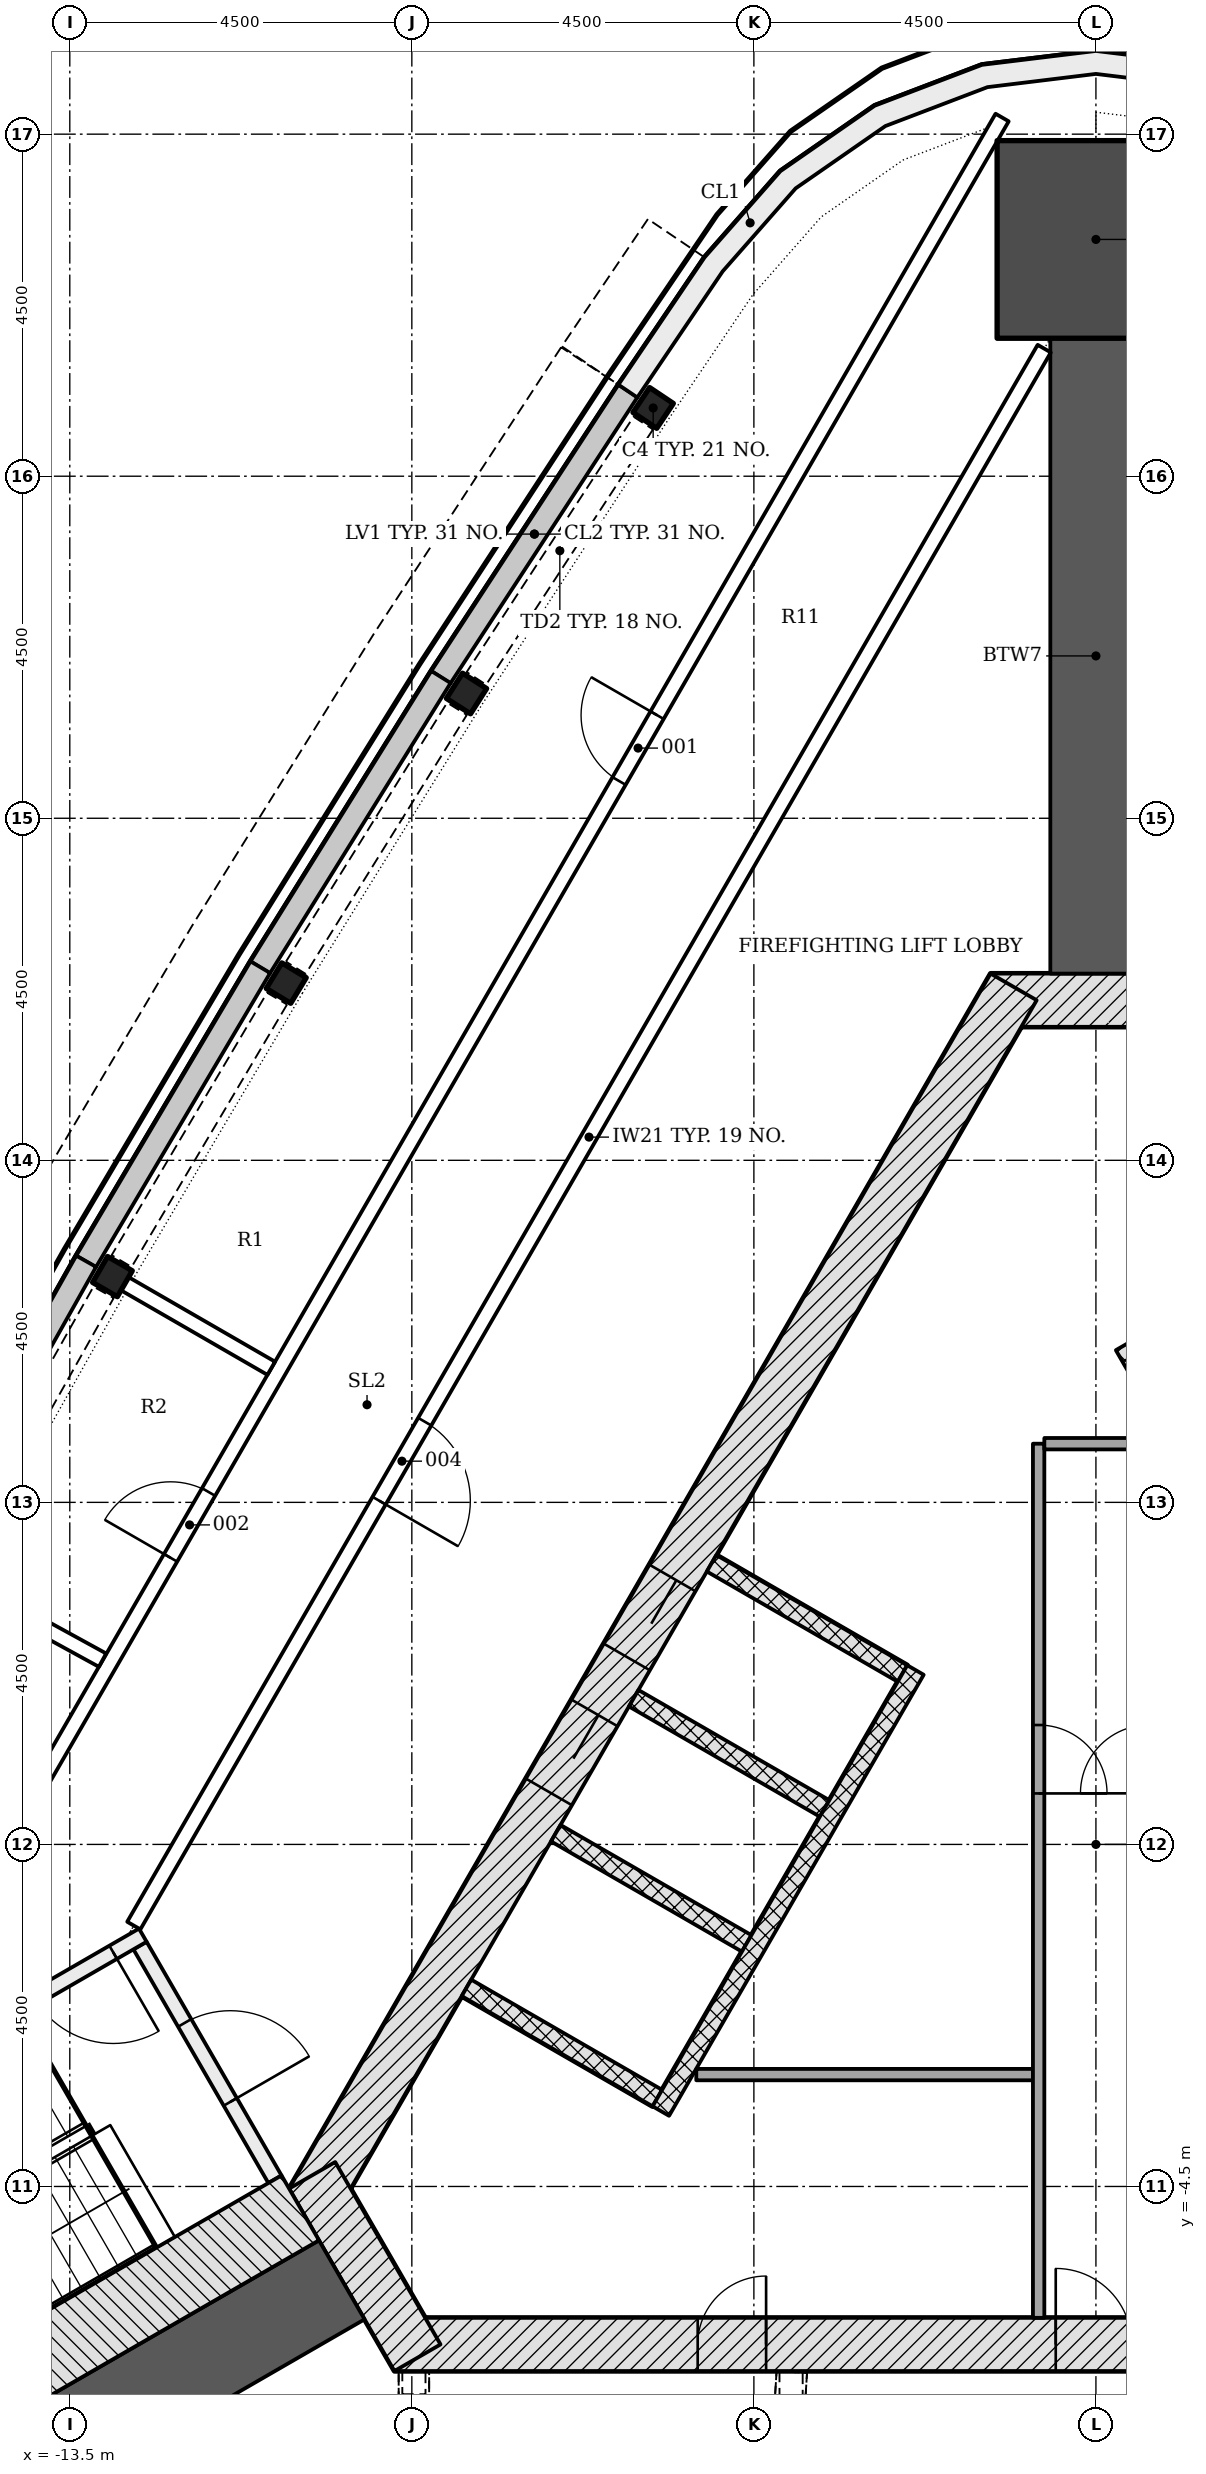
"""IFC4 building model, lengths in metres.
Left out: names, types, materials, properties, quantities, classifications, styles, units other than length and angle.
Written with IfcOpenShell. Run it as: python <this file> out.ifc"""

import sys

from ifc_helpers import new_model, si_unit, direction, frame, frame_2d, origin, origin_2d, place, context, subcontext, project, spatial, polyline, rectangle, i_section, outline, extrude, element, fill, save


model = new_model("IFC4")
c1 = context("Model", 3, precision=1e-05, world=origin(), true_north=direction((0.0, 1.0)))
c2 = subcontext(c1, "Body", "Model", "MODEL_VIEW")
j1 = project(units=[si_unit("LENGTHUNIT", "METRE"), si_unit("PLANEANGLEUNIT", "RADIAN")], contexts=[c1])
p1 = place(None, origin())
s1 = spatial("IfcSite", under=j1, at=p1, CompositionType="ELEMENT")
p2 = place(p1, origin())
s2 = spatial("IfcBuilding", under=s1, at=p2, CompositionType="ELEMENT")
p3 = place(p2, frame((0.0, 0.0, 210.3)))
s3 = spatial("IfcBuildingStorey", under=s2, at=p3, CompositionType="ELEMENT", Elevation=210.3)
p4 = place(p3, frame((-9.229, -6.578, -0.3), z_axis=(0.0, 0.0, 1.0), x_axis=(1.0, 0.0, 0.0)))
e1 = element("IfcWall", 1, at=p4, inside=s3, PredefinedType="SHEAR", context=c2, shape_type="SweptSolid", body=[
    extrude(rectangle(XDim=18.458, YDim=0.7, at=frame_2d((9.229, 0.0))), origin(), (0.0, 0.0, 1.0), 4.6),
])
p5 = place(p4, frame((8.7, 0.0, 0.3)))
e2 = element("IfcOpeningElement", 2, at=p5, cuts=e1, PredefinedType="OPENING", context=c2, shape_type="SweptSolid", body=[
    extrude(rectangle(XDim=1.0, YDim=2.1, at=frame_2d((0.5, 1.05))), frame((0.0, 0.36, 0.0), z_axis=(0.0, -1.0, 0.0), x_axis=(1.0, 0.0, 0.0)), (0.0, 0.0, 1.0), 0.72),
])
p6 = place(p4, frame((3.99, 0.0, 0.3)))
e3 = element("IfcOpeningElement", 3, at=p6, cuts=e1, PredefinedType="OPENING", context=c2, shape_type="SweptSolid", body=[
    extrude(rectangle(XDim=0.9, YDim=2.1, at=frame_2d((0.45, 1.05))), frame((0.0, 0.36, 0.0), z_axis=(0.0, -1.0, 0.0), x_axis=(1.0, 0.0, 0.0)), (0.0, 0.0, 1.0), 0.72),
])
p7 = place(p4, frame((13.539, 0.0, 0.3)))
e4 = element("IfcOpeningElement", 4, at=p7, cuts=e1, PredefinedType="OPENING", context=c2, shape_type="SweptSolid", body=[
    extrude(rectangle(XDim=0.9, YDim=2.1, at=frame_2d((0.45, 1.05))), frame((0.0, 0.36, 0.0), z_axis=(0.0, -1.0, 0.0), x_axis=(1.0, 0.0, 0.0)), (0.0, 0.0, 1.0), 0.72),
])
p8 = place(p3, frame((1.386, 11.106, -0.3), z_axis=(0.0, 0.0, 1.0), x_axis=(-1.0, 0.0, 0.0)))
e5 = element("IfcWall", 5, at=p8, inside=s3, PredefinedType="SHEAR", context=c2, shape_type="SweptSolid", body=[
    extrude(rectangle(XDim=2.771, YDim=0.7, at=frame_2d((1.386, 0.0))), origin(), (0.0, 0.0, 1.0), 4.6),
])
p9 = place(p3, frame((-1.083, 11.281, -0.3), z_axis=(0.0, 0.0, 1.0), x_axis=(-0.500001446645, -0.866024568562, 0.0)))
e6 = element("IfcWall", 6, at=p9, inside=s3, PredefinedType="SHEAR", context=c2, shape_type="SweptSolid", body=[
    extrude(rectangle(XDim=18.458, YDim=0.7, at=frame_2d((9.229, 0.0))), origin(), (0.0, 0.0, 1.0), 4.6),
])
p10 = place(p9, frame((8.979, 0.0, 0.3)))
e7 = element("IfcOpeningElement", 7, at=p10, cuts=e6, PredefinedType="OPENING", context=c2, shape_type="SweptSolid", body=[
    extrude(rectangle(XDim=1.2, YDim=2.1, at=frame_2d((0.6, 1.05))), frame((0.0, 0.36, 0.0), z_axis=(0.0, -1.0, 0.0), x_axis=(1.0, 0.0, 0.0)), (0.0, 0.0, 1.0), 0.72),
])
p11 = place(p9, frame((11.029, 0.0, 0.3)))
e8 = element("IfcOpeningElement", 8, at=p11, cuts=e6, PredefinedType="OPENING", context=c2, shape_type="SweptSolid", body=[
    extrude(rectangle(XDim=1.2, YDim=2.1, at=frame_2d((0.6, 1.05))), frame((0.0, 0.36, 0.0), z_axis=(0.0, -1.0, 0.0), x_axis=(1.0, 0.0, 0.0)), (0.0, 0.0, 1.0), 0.72),
])
p12 = place(p3, frame((-10.311, -4.353, -0.3), z_axis=(0.0, 0.0, 1.0), x_axis=(0.500042739161, -0.866000726912, 0.0)))
e9 = element("IfcWall", 9, at=p12, inside=s3, PredefinedType="SHEAR", context=c2, shape_type="SweptSolid", body=[
    extrude(rectangle(XDim=2.771, YDim=0.7, at=frame_2d((1.386, 0.0))), origin(), (0.0, 0.0, 1.0), 4.6),
])
for number, where, z_axis, x_axis in (
    (10, (0.0, 11.456, -0.3), (0.0, 0.0, 1.0), (0.0, 1.0, 0.0)),
    (11, (-9.922, -5.728, -0.3), (0.0, 0.0, 1.0), (-0.866, -0.5, 0.0)),
):
    element("IfcWall", number, at=place(p3, frame(where, z_axis=z_axis, x_axis=x_axis)), inside=s3, PredefinedType="SHEAR", context=c2, shape_type="SweptSolid", body=[
        extrude(rectangle(XDim=8.359, YDim=1.2, at=frame_2d((4.179, 0.0))), origin(), (0.0, 0.0, 1.0), 4.6),
    ])
p13 = place(p3, frame((0.0, 21.115, -0.3), z_axis=(0.0, 0.0, 1.0), x_axis=(0.0, 1.0, 0.0)))
e12 = element("IfcColumn", 12, at=p13, inside=s3, PredefinedType="COLUMN", context=c2, shape_type="SweptSolid", body=[
    extrude(rectangle(XDim=2.6, YDim=2.6, at=origin_2d()), origin(), (0.0, 0.0, 1.0), 4.6),
])
for number, where, z_axis, x_axis in (
    (13, (-5.825, 18.898, -0.3), (0.0, 0.0, 1.0), (-0.556, -0.831, 0.0)),
    (14, (-8.281, 15.142, -0.3), (0.0, 0.0, 1.0), (-0.538, -0.843, 0.0)),
    (15, (-10.652, 11.332, -0.3), (0.0, 0.0, 1.0), (-0.519, -0.855, 0.0)),
    (16, (-12.939, 7.47, -0.3), (0.0, 0.0, 1.0), (-0.5, -0.866, 0.0)),
):
    element("IfcColumn", number, at=place(p3, frame(where, z_axis=z_axis, x_axis=x_axis)), inside=s3, PredefinedType="COLUMN", context=c2, shape_type="SweptSolid", body=[
        extrude(i_section(OverallWidth=0.394, OverallDepth=0.376, WebThickness=0.017, FlangeThickness=0.028, FilletRadius=0.015, at=origin_2d()), origin(), (0.0, 0.0, 1.0), 4.6),
    ])
p14 = place(p3, origin())
e17 = element("IfcWall", 17, at=p14, inside=s3, PredefinedType="NOTDEFINED", context=c2, shape_type="SweptSolid", body=[
    extrude(outline(polyline([(-6.282, 19.204), (-8.744, 15.437), (-8.493, 15.273), (-6.031, 19.04), (-6.282, 19.204)])), origin(), (0.0, 0.0, 1.0), 1.2),
])
p15 = place(p3, origin())
e18 = element("IfcWall", 18, at=p15, inside=s3, PredefinedType="NOTDEFINED", context=c2, shape_type="SweptSolid", body=[
    extrude(outline(polyline([(-8.744, 15.437), (-11.122, 11.617), (-10.867, 11.458), (-8.49, 15.279), (-8.744, 15.437)])), origin(), (0.0, 0.0, 1.0), 1.2),
])
p16 = place(p3, origin())
e19 = element("IfcWall", 19, at=p16, inside=s3, PredefinedType="NOTDEFINED", context=c2, shape_type="SweptSolid", body=[
    extrude(outline(polyline([(-11.122, 11.617), (-13.415, 7.745), (-13.157, 7.592), (-10.864, 11.464), (-11.122, 11.617)])), origin(), (0.0, 0.0, 1.0), 1.2),
])
p17 = place(p3, origin())
e20 = element("IfcWall", 20, at=p17, inside=s3, PredefinedType="NOTDEFINED", context=c2, shape_type="SweptSolid", body=[
    extrude(outline(polyline([(-13.415, 7.745), (-15.622, 3.823), (-15.36, 3.677), (-13.154, 7.598), (-13.415, 7.745)])), origin(), (0.0, 0.0, 1.0), 1.2),
])
p18 = place(p3, origin())
e21 = element("IfcWall", 21, at=p18, inside=s3, PredefinedType="NOTDEFINED", context=c2, shape_type="SweptSolid", body=[
    extrude(outline(polyline([(6.282, 19.204), (5.149, 20.879), (4.151, 22.013), (2.911, 22.874), (1.499, 23.412), (0.0, 23.595), (-1.499, 23.412), (-2.911, 22.874), (-4.151, 22.013), (-5.149, 20.879), (-6.282, 19.204), (-6.034, 19.036), (-4.911, 20.695), (-3.95, 21.787), (-2.77, 22.607), (-1.427, 23.119), (0.0, 23.293), (1.427, 23.119), (2.77, 22.607), (3.95, 21.787), (4.911, 20.695), (6.034, 19.036), (6.282, 19.204)])), origin(), (0.0, 0.0, 1.0), 4.3),
])
p19 = place(p3, frame((5.87, -2.961, 0.0), z_axis=(0.0, 0.0, 1.0), x_axis=(-0.50000615651, 0.866021849293, 0.0)))
e22 = element("IfcWall", 22, at=p19, inside=s3, PredefinedType="PARTITIONING", context=c2, shape_type="SweptSolid", body=[
    extrude(rectangle(XDim=11.0, YDim=0.25, at=frame_2d((5.5, 0.0))), origin(), (0.0, 0.0, 1.0), 4.3),
])
for number, where, z_axis, x_axis in (
    (23, (-5.056, 3.699, -0.3), (0.0, 0.0, 1.0), (0.866, -0.5, 0.0)),
    (24, (-6.081, 1.923, -0.3), (0.0, 0.0, 1.0), (0.866, -0.5, 0.0)),
    (25, (-7.106, 0.148, -0.3), (0.0, 0.0, 1.0), (0.866, -0.5, 0.0)),
    (26, (-8.281, -1.887, -0.3), (0.0, 0.0, 1.0), (0.866, -0.5, 0.0)),
):
    element("IfcWall", number, at=place(p3, frame(where, z_axis=z_axis, x_axis=x_axis)), inside=s3, PredefinedType="PARTITIONING", context=c2, shape_type="SweptSolid", body=[
        extrude(rectangle(XDim=2.9, YDim=0.25, at=frame_2d((1.45, 0.0))), origin(), (0.0, 0.0, 1.0), 4.6),
    ])
p20 = place(p3, frame((-2.374, 2.294, 0.0), z_axis=(0.0, 0.0, 1.0), x_axis=(-0.500003174267, -0.866023571113, 0.0)))
e27 = element("IfcWall", 27, at=p20, inside=s3, PredefinedType="PARTITIONING", context=c2, shape_type="SweptSolid", body=[
    extrude(rectangle(XDim=6.7, YDim=0.25, at=frame_2d((3.35, 0.0))), origin(), (0.0, 0.0, 1.0), 4.3),
])
p21 = place(p3, frame((-5.258, -3.028, 0.0), z_axis=(0.0, 0.0, 1.0), x_axis=(1.0, 0.0, 0.0)))
e28 = element("IfcWall", 28, at=p21, inside=s3, PredefinedType="PARTITIONING", context=c2, shape_type="SweptSolid", body=[
    extrude(rectangle(XDim=4.429, YDim=0.15, at=frame_2d((2.215, 0.0))), origin(), (0.0, 0.0, 1.0), 4.3),
])
p22 = place(p3, frame((-0.754, 5.272, 0.0), z_axis=(0.0, 0.0, 1.0), x_axis=(0.0, -1.0, 0.0)))
e29 = element("IfcWall", 29, at=p22, inside=s3, PredefinedType="PARTITIONING", context=c2, shape_type="SweptSolid", body=[
    extrude(rectangle(XDim=11.5, YDim=0.15, at=frame_2d((5.75, 0.0))), origin(), (0.0, 0.0, 1.0), 4.3),
])
p23 = place(p22, frame((3.701, 0.0, 0.0)))
e30 = element("IfcOpeningElement", 30, at=p23, cuts=e29, PredefinedType="OPENING", context=c2, shape_type="SweptSolid", body=[
    extrude(rectangle(XDim=0.9, YDim=2.1, at=frame_2d((0.45, 1.05))), frame((0.0, 0.085, 0.0), z_axis=(0.0, -1.0, 0.0), x_axis=(1.0, 0.0, 0.0)), (0.0, 0.0, 1.0), 0.17),
])
p24 = place(p3, frame((-0.679, 5.272, 0.0), z_axis=(0.0, 0.0, 1.0), x_axis=(1.0, 0.0, 0.0)))
e31 = element("IfcWall", 31, at=p24, inside=s3, PredefinedType="PARTITIONING", context=c2, shape_type="SweptSolid", body=[
    extrude(rectangle(XDim=1.3, YDim=0.15, at=frame_2d((0.65, 0.0))), origin(), (0.0, 0.0, 1.0), 4.3),
])
p25 = place(p3, frame((-12.576, -1.331, -0.3), z_axis=(0.0, 0.0, 1.0), x_axis=(0.499970499736, -0.8660424351, 0.0)))
e32 = element("IfcWall", 32, at=p25, inside=s3, PredefinedType="SHEAR", context=c2, shape_type="SweptSolid", body=[
    extrude(rectangle(XDim=3.55, YDim=0.2, at=frame_2d((1.775, 0.0))), origin(), (0.0, 0.0, 1.0), 4.6),
])
p26 = place(p25, frame((1.175, 0.0, 0.3)))
e33 = element("IfcOpeningElement", 33, at=p26, cuts=e32, PredefinedType="OPENING", context=c2, shape_type="SweptSolid", body=[
    extrude(rectangle(XDim=1.2, YDim=2.1, at=frame_2d((0.6, 1.05))), frame((0.0, 0.11, 0.0), z_axis=(0.0, -1.0, 0.0), x_axis=(1.0, 0.0, 0.0)), (0.0, 0.0, 1.0), 0.22),
])
p27 = place(p3, frame((-12.539, -1.194, -0.3), z_axis=(0.0, 0.0, 1.0), x_axis=(-0.866045472092, -0.499965239061, 0.0)))
e34 = element("IfcWall", 34, at=p27, inside=s3, PredefinedType="SHEAR", context=c2, shape_type="SweptSolid", body=[
    extrude(rectangle(XDim=5.6, YDim=0.2, at=frame_2d((2.8, 0.0))), origin(), (0.0, 0.0, 1.0), 4.6),
])
p28 = place(p27, frame((0.45, 0.0, 0.3)))
e35 = element("IfcOpeningElement", 35, at=p28, cuts=e34, PredefinedType="OPENING", context=c2, shape_type="SweptSolid", body=[
    extrude(rectangle(XDim=1.2, YDim=2.1, at=frame_2d((0.6, 1.05))), frame((0.0, 0.11, 0.0), z_axis=(0.0, -1.0, 0.0), x_axis=(1.0, 0.0, 0.0)), (0.0, 0.0, 1.0), 0.22),
])
p29 = place(p3, frame((-10.468, -4.782, -0.3), z_axis=(0.0, 0.0, 1.0), x_axis=(-0.866018442252, -0.500012057535, 0.0)))
e36 = element("IfcWall", 36, at=p29, inside=s3, PredefinedType="SHEAR", context=c2, shape_type="SweptSolid", body=[
    extrude(rectangle(XDim=7.2, YDim=0.986, at=frame_2d((3.6, 0.0))), origin(), (0.0, 0.0, 1.0), 4.6),
])
p30 = place(p3, frame((-0.68, 19.678, 0.0), z_axis=(0.0, 0.0, 1.0), x_axis=(-0.49999622545, -0.866027583011, 0.0)))
e37 = element("IfcWall", 37, at=p30, inside=s3, PredefinedType="PARTITIONING", context=c2, shape_type="SweptSolid", body=[
    extrude(rectangle(XDim=23.956, YDim=0.2, at=frame_2d((11.978, 0.0))), origin(), (0.0, 0.0, 1.0), 3.752),
])
p31 = place(p30, frame((16.301, 0.0, 0.0)))
e38 = element("IfcOpeningElement", 38, at=p31, cuts=e37, PredefinedType="OPENING", context=c2, shape_type="SweptSolid", body=[
    extrude(rectangle(XDim=1.2, YDim=2.1, at=frame_2d((0.6, 1.05))), frame((0.0, 0.11, 0.0), z_axis=(0.0, -1.0, 0.0), x_axis=(1.0, 0.0, 0.0)), (0.0, 0.0, 1.0), 0.22),
])
p32 = place(p3, frame((-16.104, -3.037, 0.0), z_axis=(0.0, 0.0, 1.0), x_axis=(0.499996511208, 0.86602741803, 0.0)))
e39 = element("IfcWall", 39, at=p32, inside=s3, PredefinedType="PARTITIONING", context=c2, shape_type="SweptSolid", body=[
    extrude(rectangle(XDim=29.74, YDim=0.2, at=frame_2d((14.87, 0.0))), origin(), (0.0, 0.0, 1.0), 3.752),
])
p33 = place(p32, frame((19.661, 0.0, 0.0)))
e40 = element("IfcOpeningElement", 40, at=p33, cuts=e39, PredefinedType="OPENING", context=c2, shape_type="SweptSolid", body=[
    extrude(rectangle(XDim=1.0, YDim=2.1, at=frame_2d((0.5, 1.05))), frame((0.0, 0.11, 0.0), z_axis=(0.0, -1.0, 0.0), x_axis=(1.0, 0.0, 0.0)), (0.0, 0.0, 1.0), 0.22),
])
p34 = place(p32, frame((7.86, 0.0, 0.0)))
e41 = element("IfcOpeningElement", 41, at=p34, cuts=e39, PredefinedType="OPENING", context=c2, shape_type="SweptSolid", body=[
    extrude(rectangle(XDim=1.0, YDim=2.1, at=frame_2d((0.5, 1.05))), frame((0.0, 0.11, 0.0), z_axis=(0.0, -1.0, 0.0), x_axis=(1.0, 0.0, 0.0)), (0.0, 0.0, 1.0), 0.22),
])
p35 = place(p32, frame((2.64, 0.0, 0.0)))
e42 = element("IfcOpeningElement", 42, at=p35, cuts=e39, PredefinedType="OPENING", context=c2, shape_type="SweptSolid", body=[
    extrude(rectangle(XDim=1.0, YDim=2.1, at=frame_2d((0.5, 1.05))), frame((0.0, 0.11, 0.0), z_axis=(0.0, -1.0, 0.0), x_axis=(1.0, 0.0, 0.0)), (0.0, 0.0, 1.0), 0.22),
])
p36 = place(p3, frame((-12.809, 7.395, 0.0), z_axis=(0.0, 0.0, 1.0), x_axis=(0.866036427558, -0.499980905779, 0.0)))
e43 = element("IfcWall", 43, at=p36, inside=s3, PredefinedType="PARTITIONING", context=c2, shape_type="SweptSolid", body=[
    extrude(rectangle(XDim=2.262, YDim=0.2, at=frame_2d((1.131, 0.0))), origin(), (0.0, 0.0, 1.0), 3.752),
])
p37 = place(p3, frame((-15.008, 3.487, 0.0), z_axis=(0.0, 0.0, 1.0), x_axis=(0.876893493113, -0.480684721763, 0.0)))
e44 = element("IfcWall", 44, at=p37, inside=s3, PredefinedType="PARTITIONING", context=c2, shape_type="SweptSolid", body=[
    extrude(rectangle(XDim=2.211, YDim=0.2, at=frame_2d((1.105, 0.0))), origin(), (0.0, 0.0, 1.0), 3.752),
])
p38 = place(p10, origin())
e45 = element("IfcDoor", 45, at=p38, inside=s3, OperationType="DOUBLE_DOOR_SLIDING", PredefinedType="DOOR", context=c2, shape_type="SweptSolid", body=[
    extrude(rectangle(XDim=1.2, YDim=2.1, at=frame_2d((0.6, 1.05))), frame((0.0, 0.025, 0.0), z_axis=(0.0, -1.0, 0.0), x_axis=(1.0, 0.0, 0.0)), (0.0, 0.0, 1.0), 0.05),
])
fill(e7, e45)
p39 = place(p11, origin())
e46 = element("IfcDoor", 46, at=p39, inside=s3, OperationType="DOUBLE_DOOR_SLIDING", PredefinedType="DOOR", context=c2, shape_type="SweptSolid", body=[
    extrude(rectangle(XDim=1.2, YDim=2.1, at=frame_2d((0.6, 1.05))), frame((0.0, 0.025, 0.0), z_axis=(0.0, -1.0, 0.0), x_axis=(1.0, 0.0, 0.0)), (0.0, 0.0, 1.0), 0.05),
])
fill(e8, e46)
p40 = place(p5, origin())
e47 = element("IfcDoor", 47, at=p40, inside=s3, OperationType="SINGLE_SWING_LEFT", PredefinedType="DOOR", context=c2, shape_type="SweptSolid", body=[
    extrude(rectangle(XDim=1.0, YDim=2.1, at=frame_2d((0.5, 1.05))), frame((0.0, 0.075, 0.0), z_axis=(0.0, -1.0, 0.0), x_axis=(1.0, 0.0, 0.0)), (0.0, 0.0, 1.0), 0.15),
])
fill(e2, e47)
p41 = place(p6, origin())
e48 = element("IfcDoor", 48, at=p41, inside=s3, OperationType="SINGLE_SWING_RIGHT", PredefinedType="DOOR", context=c2, shape_type="SweptSolid", body=[
    extrude(rectangle(XDim=0.9, YDim=2.1, at=frame_2d((0.45, 1.05))), frame((0.0, 0.075, 0.0), z_axis=(0.0, -1.0, 0.0), x_axis=(1.0, 0.0, 0.0)), (0.0, 0.0, 1.0), 0.15),
])
fill(e3, e48)
p42 = place(p23, origin())
e49 = element("IfcDoor", 49, at=p42, inside=s3, OperationType="SINGLE_SWING_RIGHT", PredefinedType="DOOR", context=c2, shape_type="SweptSolid", body=[
    extrude(rectangle(XDim=0.9, YDim=2.1, at=frame_2d((0.45, 1.05))), frame((0.0, 0.025, 0.0), z_axis=(0.0, -1.0, 0.0), x_axis=(1.0, 0.0, 0.0)), (0.0, 0.0, 1.0), 0.05),
])
fill(e30, e49)
p43 = place(p26, origin())
e50 = element("IfcDoor", 50, at=p43, inside=s3, OperationType="SINGLE_SWING_RIGHT", PredefinedType="DOOR", context=c2, shape_type="SweptSolid", body=[
    extrude(rectangle(XDim=1.2, YDim=2.1, at=frame_2d((0.6, 1.05))), frame((0.0, 0.025, 0.0), z_axis=(0.0, -1.0, 0.0), x_axis=(1.0, 0.0, 0.0)), (0.0, 0.0, 1.0), 0.05),
])
fill(e33, e50)
p44 = place(p28, origin())
e51 = element("IfcDoor", 51, at=p44, inside=s3, OperationType="SINGLE_SWING_LEFT", PredefinedType="DOOR", context=c2, shape_type="SweptSolid", body=[
    extrude(rectangle(XDim=1.2, YDim=2.1, at=frame_2d((0.6, 1.05))), frame((0.0, 0.025, 0.0), z_axis=(0.0, -1.0, 0.0), x_axis=(1.0, 0.0, 0.0)), (0.0, 0.0, 1.0), 0.05),
])
fill(e35, e51)
p45 = place(p33, origin())
e52 = element("IfcDoor", 52, at=p45, inside=s3, OperationType="SINGLE_SWING_RIGHT", PredefinedType="DOOR", context=c2, shape_type="SweptSolid", body=[
    extrude(rectangle(XDim=1.0, YDim=2.1, at=frame_2d((0.5, 1.05))), frame((0.0, 0.025, 0.0), z_axis=(0.0, -1.0, 0.0), x_axis=(1.0, 0.0, 0.0)), (0.0, 0.0, 1.0), 0.05),
])
fill(e40, e52)
p46 = place(p34, origin())
e53 = element("IfcDoor", 53, at=p46, inside=s3, OperationType="SINGLE_SWING_LEFT", PredefinedType="DOOR", context=c2, shape_type="SweptSolid", body=[
    extrude(rectangle(XDim=1.0, YDim=2.1, at=frame_2d((0.5, 1.05))), frame((0.0, 0.025, 0.0), z_axis=(0.0, -1.0, 0.0), x_axis=(1.0, 0.0, 0.0)), (0.0, 0.0, 1.0), 0.05),
])
fill(e41, e53)
p47 = place(p31, origin())
e54 = element("IfcDoor", 54, at=p47, inside=s3, OperationType="SINGLE_SWING_RIGHT", PredefinedType="DOOR", context=c2, shape_type="SweptSolid", body=[
    extrude(rectangle(XDim=1.2, YDim=2.1, at=frame_2d((0.6, 1.05))), frame((0.0, 0.025, 0.0), z_axis=(0.0, -1.0, 0.0), x_axis=(1.0, 0.0, 0.0)), (0.0, 0.0, 1.0), 0.05),
])
fill(e38, e54)
save(model, sys.argv[1])
